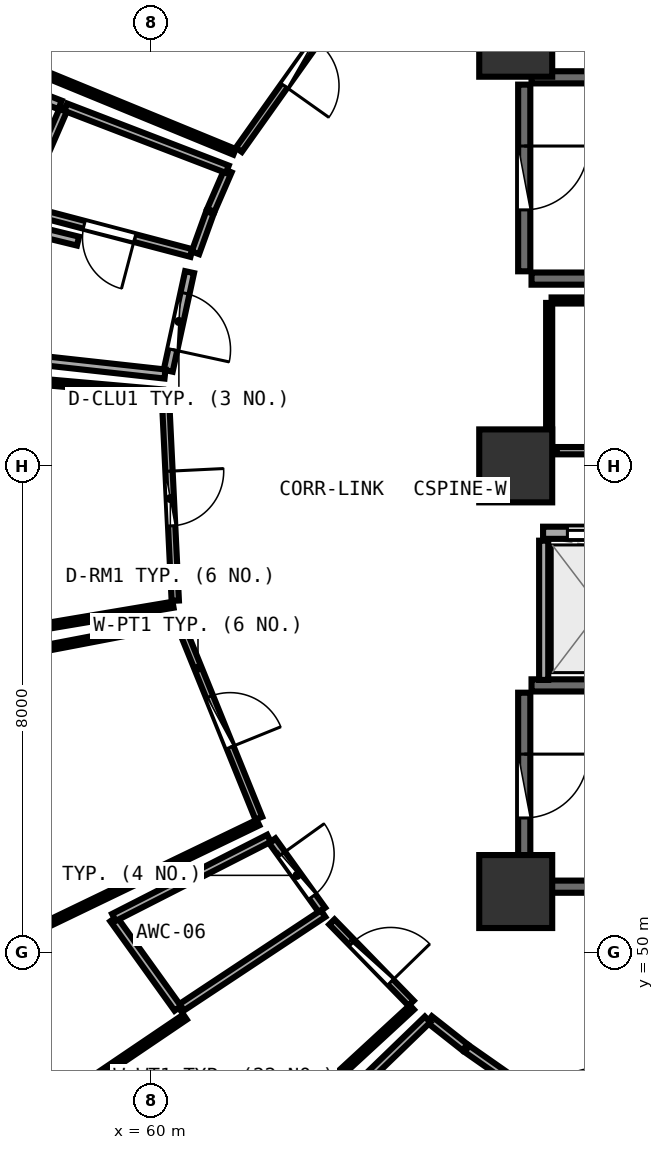
"""IFC4 building model, lengths in metres.
Left out: names, types, materials, properties, quantities, classifications, styles, units other than length and angle.
Written with IfcOpenShell. Run it as: python <this file> out.ifc"""

import sys

from ifc_helpers import new_model, si_unit, direction, frame, frame_2d, origin, origin_2d, place, context, subcontext, project, spatial, rectangle, extrude, element, fill, save


model = new_model("IFC4")
c1 = context("Model", 3, precision=1e-05, world=origin(), true_north=direction((0.0, 1.0)))
c2 = subcontext(c1, "Body", "Model", "MODEL_VIEW")
j1 = project(units=[si_unit("LENGTHUNIT", "METRE"), si_unit("PLANEANGLEUNIT", "RADIAN")], contexts=[c1])
p1 = place(None, origin())
s1 = spatial("IfcSite", under=j1, at=p1, CompositionType="ELEMENT")
p2 = place(p1, origin())
s2 = spatial("IfcBuilding", under=s1, at=p2, CompositionType="ELEMENT")
p3 = place(p2, frame((0.0, 0.0, 158.1)))
s3 = spatial("IfcBuildingStorey", under=s2, at=p3, CompositionType="ELEMENT", Elevation=158.1)
for number, where, z_axis, x_axis in (
    (1, (66.0, 51.0, 0.0), (0.0, 0.0, 1.0), (1.0, 0.0, 0.0)),
    (2, (66.0, 65.0, 0.0), (0.0, 0.0, 1.0), (1.0, 0.0, 0.0)),
    (3, (66.0, 58.0, 0.0), (0.0, 0.0, 1.0), (1.0, 0.0, 0.0)),
):
    element("IfcColumn", number, at=place(p3, frame(where, z_axis=z_axis, x_axis=x_axis)), inside=s3, PredefinedType="PILASTER", context=c2, shape_type="SweptSolid", body=[
        extrude(rectangle(XDim=1.2, YDim=1.2, at=origin_2d()), origin(), (0.0, 0.0, 1.0), 3.75),
    ])
for number, where, z_axis, x_axis in (
    (4, (66.26, 61.08, 0.0), (0.0, 0.0, 1.0), (1.0, 0.0, 0.0)),
    (5, (73.42, 64.39, 0.0), (0.0, 0.0, 1.0), (-1.0, 0.0, 0.0)),
):
    element("IfcWall", number, at=place(p3, frame(where, z_axis=z_axis, x_axis=x_axis)), inside=s3, PredefinedType="SHEAR", context=c2, shape_type="SweptSolid", body=[
        extrude(rectangle(XDim=7.16, YDim=0.2, at=frame_2d((3.58, 0.0))), origin(), (0.0, 0.0, 1.0), 3.49),
    ])
p4 = place(p3, frame((66.14, 64.27, 0.0), z_axis=(0.0, 0.0, 1.0), x_axis=(0.0, -1.0, 0.0)))
e6 = element("IfcWall", 6, at=p4, inside=s3, PredefinedType="SHEAR", context=c2, shape_type="SweptSolid", body=[
    extrude(rectangle(XDim=3.07, YDim=0.2, at=frame_2d((1.535, 0.0))), origin(), (0.0, 0.0, 1.0), 3.49),
])
p5 = place(p4, frame((1.01, 0.0, 0.0)))
e7 = element("IfcOpeningElement", 7, at=p5, cuts=e6, PredefinedType="OPENING", context=c2, shape_type="SweptSolid", body=[
    extrude(rectangle(XDim=1.05, YDim=2.1, at=frame_2d((0.525, 1.05))), frame((0.0, 0.11, 0.0), z_axis=(0.0, -1.0, 0.0), x_axis=(1.0, 0.0, 0.0)), (0.0, 0.0, 1.0), 0.22),
])
for number, where, z_axis, x_axis in (
    (8, (66.26, 51.08, 0.0), (0.0, 0.0, 1.0), (1.0, 0.0, 0.0)),
    (9, (73.42, 54.39, 0.0), (0.0, 0.0, 1.0), (-1.0, 0.0, 0.0)),
):
    element("IfcWall", number, at=place(p3, frame(where, z_axis=z_axis, x_axis=x_axis)), inside=s3, PredefinedType="SHEAR", context=c2, shape_type="SweptSolid", body=[
        extrude(rectangle(XDim=7.16, YDim=0.2, at=frame_2d((3.58, 0.0))), origin(), (0.0, 0.0, 1.0), 3.49),
    ])
p6 = place(p3, frame((66.14, 54.27, 0.0), z_axis=(0.0, 0.0, 1.0), x_axis=(0.0, -1.0, 0.0)))
e10 = element("IfcWall", 10, at=p6, inside=s3, PredefinedType="SHEAR", context=c2, shape_type="SweptSolid", body=[
    extrude(rectangle(XDim=3.07, YDim=0.2, at=frame_2d((1.535, 0.0))), origin(), (0.0, 0.0, 1.0), 3.49),
])
p7 = place(p6, frame((1.01, 0.0, 0.0)))
e11 = element("IfcOpeningElement", 11, at=p7, cuts=e10, PredefinedType="OPENING", context=c2, shape_type="SweptSolid", body=[
    extrude(rectangle(XDim=1.05, YDim=2.1, at=frame_2d((0.525, 1.05))), frame((0.0, 0.11, 0.0), z_axis=(0.0, -1.0, 0.0), x_axis=(1.0, 0.0, 0.0)), (0.0, 0.0, 1.0), 0.22),
])
p8 = place(p3, frame((66.45, 56.9, 0.0), z_axis=(0.0, 0.0, 1.0), x_axis=(1.0, 0.0, 0.0)))
e12 = element("IfcWall", 12, at=p8, inside=s3, PredefinedType="SOLIDWALL", context=c2, shape_type="SweptSolid", body=[
    extrude(rectangle(XDim=14.4, YDim=0.2, at=frame_2d((7.2, 0.0))), origin(), (0.0, 0.0, 1.0), 3.48),
])
p9 = place(p8, frame((0.4, 0.0, 0.0)))
e13 = element("IfcOpeningElement", 13, at=p9, cuts=e12, PredefinedType="OPENING", context=c2, shape_type="SweptSolid", body=[
    extrude(rectangle(XDim=1.1, YDim=2.1, at=frame_2d((0.55, 1.05))), frame((0.0, 0.11, 0.0), z_axis=(0.0, -1.0, 0.0), x_axis=(1.0, 0.0, 0.0)), (0.0, 0.0, 1.0), 0.22),
])
p10 = place(p8, frame((2.4, 0.0, 0.0)))
e14 = element("IfcOpeningElement", 14, at=p10, cuts=e12, PredefinedType="OPENING", context=c2, shape_type="SweptSolid", body=[
    extrude(rectangle(XDim=1.1, YDim=2.1, at=frame_2d((0.55, 1.05))), frame((0.0, 0.11, 0.0), z_axis=(0.0, -1.0, 0.0), x_axis=(1.0, 0.0, 0.0)), (0.0, 0.0, 1.0), 0.22),
])
p11 = place(p8, frame((4.4, 0.0, 0.0)))
e15 = element("IfcOpeningElement", 15, at=p11, cuts=e12, PredefinedType="OPENING", context=c2, shape_type="SweptSolid", body=[
    extrude(rectangle(XDim=1.1, YDim=2.1, at=frame_2d((0.55, 1.05))), frame((0.0, 0.11, 0.0), z_axis=(0.0, -1.0, 0.0), x_axis=(1.0, 0.0, 0.0)), (0.0, 0.0, 1.0), 0.22),
])
p12 = place(p3, frame((66.46, 54.48, 0.0), z_axis=(0.0, 0.0, 1.0), x_axis=(0.0, 1.0, 0.0)))
e16 = element("IfcWall", 16, at=p12, inside=s3, PredefinedType="PARTITIONING", context=c2, shape_type="SweptSolid", body=[
    extrude(rectangle(XDim=2.29, YDim=0.15, at=frame_2d((1.145, 0.0))), origin(), (0.0, 0.0, 1.0), 3.48),
])
p13 = place(p3, frame((66.675, 58.25, 0.0), z_axis=(0.0, 0.0, 1.0), x_axis=(1.0, 0.0, 0.0)))
e17 = element("IfcWall", 17, at=p13, inside=s3, PredefinedType="PARTITIONING", context=c2, shape_type="SweptSolid", body=[
    extrude(rectangle(XDim=5.715, YDim=0.12, at=frame_2d((2.857, 0.0))), origin(), (0.0, 0.0, 1.0), 3.48),
])
p14 = place(p13, frame((2.407, 0.0, 0.0)))
e18 = element("IfcOpeningElement", 18, at=p14, cuts=e17, PredefinedType="OPENING", context=c2, shape_type="SweptSolid", body=[
    extrude(rectangle(XDim=0.9, YDim=2.08, at=frame_2d((0.45, 1.04))), frame((0.0, 0.07, 0.0), z_axis=(0.0, -1.0, 0.0), x_axis=(1.0, 0.0, 0.0)), (0.0, 0.0, 1.0), 0.14),
])
p15 = place(p3, frame((63.462, 66.038, 0.0), z_axis=(0.0, 0.0, 1.0), x_axis=(-0.578762045024, -0.815496471629, 0.0)))
e19 = element("IfcWall", 19, at=p15, inside=s3, PredefinedType="PARTITIONING", context=c2, shape_type="SweptSolid", body=[
    extrude(rectangle(XDim=3.483, YDim=0.12, at=frame_2d((1.741, 0.0))), origin(), (0.0, 0.0, 1.0), 2.975),
])
p16 = place(p15, frame((1.291, 0.0, 0.0)))
e20 = element("IfcOpeningElement", 20, at=p16, cuts=e19, PredefinedType="OPENING", context=c2, shape_type="SweptSolid", body=[
    extrude(rectangle(XDim=0.9, YDim=2.08, at=frame_2d((0.45, 1.04))), frame((0.0, 0.07, 0.0), z_axis=(0.0, -1.0, 0.0), x_axis=(1.0, 0.0, 0.0)), (0.0, 0.0, 1.0), 0.14),
])
p17 = place(p3, frame((60.667, 61.5, 0.0), z_axis=(0.0, 0.0, 1.0), x_axis=(-0.967098346806, 0.254402805813, 0.0)))
e21 = element("IfcWall", 21, at=p17, inside=s3, PredefinedType="PLUMBINGWALL", context=c2, shape_type="SweptSolid", body=[
    extrude(rectangle(XDim=2.789, YDim=0.13, at=frame_2d((1.395, 0.0))), origin(), (0.0, 0.0, 1.0), 3.175),
])
p18 = place(p17, frame((0.964, 0.0, 0.0)))
e22 = element("IfcOpeningElement", 22, at=p18, cuts=e21, PredefinedType="OPENING", context=c2, shape_type="SweptSolid", body=[
    extrude(rectangle(XDim=0.86, YDim=2.05, at=frame_2d((0.43, 1.025))), frame((0.0, 0.075, 0.0), z_axis=(0.0, -1.0, 0.0), x_axis=(1.0, 0.0, 0.0)), (0.0, 0.0, 1.0), 0.15),
])
p19 = place(p3, frame((60.636, 61.186, 0.0), z_axis=(0.0, 0.0, 1.0), x_axis=(-0.211879832264, -0.977295726318, 0.0)))
e23 = element("IfcWall", 23, at=p19, inside=s3, PredefinedType="PARTITIONING", context=c2, shape_type="SweptSolid", body=[
    extrude(rectangle(XDim=1.659, YDim=0.15, at=frame_2d((0.83, 0.0))), origin(), (0.0, 0.0, 1.0), 3.48),
])
p20 = place(p19, frame((0.355, 0.0, 0.0)))
e24 = element("IfcOpeningElement", 24, at=p20, cuts=e23, PredefinedType="OPENING", context=c2, shape_type="SweptSolid", body=[
    extrude(rectangle(XDim=0.95, YDim=2.08, at=frame_2d((0.475, 1.04))), frame((0.0, 0.085, 0.0), z_axis=(0.0, -1.0, 0.0), x_axis=(1.0, 0.0, 0.0)), (0.0, 0.0, 1.0), 0.17),
])
p21 = place(p3, frame((60.238, 59.144, 0.0), z_axis=(0.0, 0.0, 1.0), x_axis=(0.048537190422, -0.998821375996, 0.0)))
e25 = element("IfcWall", 25, at=p21, inside=s3, PredefinedType="PARTITIONING", context=c2, shape_type="SweptSolid", body=[
    extrude(rectangle(XDim=3.365, YDim=0.12, at=frame_2d((1.683, 0.0))), origin(), (0.0, 0.0, 1.0), 2.975),
])
p22 = place(p21, frame((1.233, 0.0, 0.0)))
e26 = element("IfcOpeningElement", 26, at=p22, cuts=e25, PredefinedType="OPENING", context=c2, shape_type="SweptSolid", body=[
    extrude(rectangle(XDim=0.9, YDim=2.08, at=frame_2d((0.45, 1.04))), frame((0.0, 0.07, 0.0), z_axis=(0.0, -1.0, 0.0), x_axis=(1.0, 0.0, 0.0)), (0.0, 0.0, 1.0), 0.14),
])
p23 = place(p3, frame((60.492, 55.369, 0.0), z_axis=(0.0, 0.0, 1.0), x_axis=(0.3756420079, -0.926764847143, 0.0)))
e27 = element("IfcWall", 27, at=p23, inside=s3, PredefinedType="PARTITIONING", context=c2, shape_type="SweptSolid", body=[
    extrude(rectangle(XDim=3.413, YDim=0.12, at=frame_2d((1.707, 0.0))), origin(), (0.0, 0.0, 1.0), 3.235),
])
p24 = place(p23, frame((1.256, 0.0, 0.0)))
e28 = element("IfcOpeningElement", 28, at=p24, cuts=e27, PredefinedType="OPENING", context=c2, shape_type="SweptSolid", body=[
    extrude(rectangle(XDim=0.9, YDim=2.08, at=frame_2d((0.45, 1.04))), frame((0.0, 0.07, 0.0), z_axis=(0.0, -1.0, 0.0), x_axis=(1.0, 0.0, 0.0)), (0.0, 0.0, 1.0), 0.14),
])
p25 = place(p3, frame((61.995, 51.836, 0.0), z_axis=(0.0, 0.0, 1.0), x_axis=(0.583589438572, -0.81204886995, 0.0)))
e29 = element("IfcWall", 29, at=p25, inside=s3, PredefinedType="PLUMBINGWALL", context=c2, shape_type="SweptSolid", body=[
    extrude(rectangle(XDim=1.403, YDim=0.13, at=frame_2d((0.702, 0.0))), origin(), (0.0, 0.0, 1.0), 2.975),
])
p26 = place(p25, frame((0.272, 0.0, 0.0)))
e30 = element("IfcOpeningElement", 30, at=p26, cuts=e29, PredefinedType="OPENING", context=c2, shape_type="SweptSolid", body=[
    extrude(rectangle(XDim=0.86, YDim=2.05, at=frame_2d((0.43, 1.025))), frame((0.0, 0.075, 0.0), z_axis=(0.0, -1.0, 0.0), x_axis=(1.0, 0.0, 0.0)), (0.0, 0.0, 1.0), 0.15),
])
p27 = place(p3, frame((62.977, 50.5, 0.0), z_axis=(0.0, 0.0, 1.0), x_axis=(0.69801962686, -0.71607862733, 0.0)))
e31 = element("IfcWall", 31, at=p27, inside=s3, PredefinedType="PARTITIONING", context=c2, shape_type="SweptSolid", body=[
    extrude(rectangle(XDim=1.866, YDim=0.12, at=frame_2d((0.933, 0.0))), origin(), (0.0, 0.0, 1.0), 2.975),
])
p28 = place(p27, frame((0.483, 0.0, 0.0)))
e32 = element("IfcOpeningElement", 32, at=p28, cuts=e31, PredefinedType="OPENING", context=c2, shape_type="SweptSolid", body=[
    extrude(rectangle(XDim=0.9, YDim=2.08, at=frame_2d((0.45, 1.04))), frame((0.0, 0.07, 0.0), z_axis=(0.0, -1.0, 0.0), x_axis=(1.0, 0.0, 0.0)), (0.0, 0.0, 1.0), 0.14),
])
p29 = place(p3, frame((72.41, 60.72, 0.0), z_axis=(0.0, 0.0, 1.0), x_axis=(-1.0, 0.0, 0.0)))
e33 = element("IfcWall", 33, at=p29, inside=s3, PredefinedType="PARTITIONING", context=c2, shape_type="SweptSolid", body=[
    extrude(rectangle(XDim=5.82, YDim=0.1, at=frame_2d((2.91, 0.0))), origin(), (0.0, 0.0, 1.0), 3.48),
])
p30 = place(p3, frame((66.55, 60.68, 0.0), z_axis=(0.0, 0.0, 1.0), x_axis=(0.0, -1.0, 0.0)))
e34 = element("IfcWall", 34, at=p30, inside=s3, PredefinedType="PARTITIONING", context=c2, shape_type="SweptSolid", body=[
    extrude(rectangle(XDim=2.383, YDim=0.1, at=frame_2d((1.191, 0.0))), origin(), (0.0, 0.0, 1.0), 3.48),
])
p31 = place(p3, frame((61.375, 63.164, 0.0), z_axis=(0.0, 0.0, 1.0), x_axis=(-0.924943940784, 0.380103546953, 0.0)))
e35 = element("IfcWall", 35, at=p31, inside=s3, PredefinedType="PARTITIONING", context=c2, shape_type="SweptSolid", body=[
    extrude(rectangle(XDim=8.038, YDim=0.1, at=frame_2d((4.019, 0.0))), origin(), (0.0, 0.0, 1.0), 2.975),
])
p32 = place(p3, frame((61.268, 62.853, 0.0), z_axis=(0.0, 0.0, 1.0), x_axis=(-0.398284741881, -0.917261829787, 0.0)))
e36 = element("IfcWall", 36, at=p32, inside=s3, PredefinedType="PLUMBINGWALL", context=c2, shape_type="SweptSolid", body=[
    extrude(rectangle(XDim=0.708, YDim=0.13, at=frame_2d((0.354, 0.0))), origin(), (0.0, 0.0, 1.0), 3.235),
])
p33 = place(p3, frame((60.971, 62.166, 0.0), z_axis=(0.0, 0.0, 1.0), x_axis=(-0.340044773791, -0.940409246987, 0.0)))
e37 = element("IfcWall", 37, at=p33, inside=s3, PredefinedType="PLUMBINGWALL", context=c2, shape_type="SweptSolid", body=[
    extrude(rectangle(XDim=0.704, YDim=0.13, at=frame_2d((0.352, 0.0))), origin(), (0.0, 0.0, 1.0), 3.235),
])
p34 = place(p3, frame((58.227, 63.093, 0.0), z_axis=(0.0, 0.0, 1.0), x_axis=(0.39925148709, 0.916841453064, 0.0)))
e38 = element("IfcWall", 38, at=p34, inside=s3, PredefinedType="PLUMBINGWALL", context=c2, shape_type="SweptSolid", body=[
    extrude(rectangle(XDim=0.866, YDim=0.13, at=frame_2d((0.433, 0.0))), origin(), (0.0, 0.0, 1.0), 3.175),
])
p35 = place(p3, frame((58.6, 63.899, 0.0), z_axis=(0.0, 0.0, 1.0), x_axis=(0.933544382438, -0.358461833418, 0.0)))
e39 = element("IfcWall", 39, at=p35, inside=s3, PredefinedType="PLUMBINGWALL", context=c2, shape_type="SweptSolid", body=[
    extrude(rectangle(XDim=2.847, YDim=0.13, at=frame_2d((1.423, 0.0))), origin(), (0.0, 0.0, 1.0), 3.175),
])
p36 = place(p3, frame((60.232, 59.51, 0.0), z_axis=(0.0, 0.0, 1.0), x_axis=(-0.993990557846, 0.109465843587, 0.0)))
e40 = element("IfcWall", 40, at=p36, inside=s3, PredefinedType="PARTITIONING", context=c2, shape_type="SweptSolid", body=[
    extrude(rectangle(XDim=8.158, YDim=0.15, at=frame_2d((4.079, 0.0))), origin(), (0.0, 0.0, 1.0), 3.025),
])
p37 = place(p3, frame((53.723, 65.777, 0.0), z_axis=(0.0, 0.0, 1.0), x_axis=(0.933303856141, -0.359087610636, 0.0)))
e41 = element("IfcWall", 41, at=p37, inside=s3, PredefinedType="PARTITIONING", context=c2, shape_type="SweptSolid", body=[
    extrude(rectangle(XDim=5.125, YDim=0.15, at=frame_2d((2.562, 0.0))), origin(), (0.0, 0.0, 1.0), 2.975),
])
p38 = place(p3, frame((57.821, 61.936, 0.0), z_axis=(0.0, 0.0, 1.0), x_axis=(0.971451046406, -0.237240098712, 0.0)))
e42 = element("IfcWall", 42, at=p38, inside=s3, PredefinedType="PARTITIONING", context=c2, shape_type="SweptSolid", body=[
    extrude(rectangle(XDim=1.01, YDim=0.15, at=frame_2d((0.505, 0.0))), origin(), (0.0, 0.0, 1.0), 3.175),
])
p39 = place(p3, frame((60.365, 55.716, 0.0), z_axis=(0.0, 0.0, 1.0), x_axis=(-0.986127701838, -0.165988420279, 0.0)))
e43 = element("IfcWall", 43, at=p39, inside=s3, PredefinedType="PARTITIONING", context=c2, shape_type="SweptSolid", body=[
    extrude(rectangle(XDim=8.144, YDim=0.1, at=frame_2d((4.072, 0.0))), origin(), (0.0, 0.0, 1.0), 3.025),
])
p40 = place(p3, frame((52.064, 59.921, 0.0), z_axis=(0.0, 0.0, 1.0), x_axis=(0.996168646625, -0.087453001553, 0.0)))
e44 = element("IfcWall", 44, at=p40, inside=s3, PredefinedType="PARTITIONING", context=c2, shape_type="SweptSolid", body=[
    extrude(rectangle(XDim=8.163, YDim=0.1, at=frame_2d((4.082, 0.0))), origin(), (0.0, 0.0, 1.0), 3.025),
])
p41 = place(p3, frame((61.761, 52.134, 0.0), z_axis=(0.0, 0.0, 1.0), x_axis=(-0.900968975812, -0.433883515042, 0.0)))
e45 = element("IfcWall", 45, at=p41, inside=s3, PredefinedType="PARTITIONING", context=c2, shape_type="SweptSolid", body=[
    extrude(rectangle(XDim=8.0, YDim=0.1, at=frame_2d((4.0, 0.0))), origin(), (0.0, 0.0, 1.0), 2.975),
])
p42 = place(p3, frame((52.438, 53.888, 0.0), z_axis=(0.0, 0.0, 1.0), x_axis=(0.982187250003, 0.187904778897, 0.0)))
e46 = element("IfcWall", 46, at=p42, inside=s3, PredefinedType="PARTITIONING", context=c2, shape_type="SweptSolid", body=[
    extrude(rectangle(XDim=8.137, YDim=0.1, at=frame_2d((4.069, 0.0))), origin(), (0.0, 0.0, 1.0), 3.025),
])
p43 = place(p3, frame((62.832, 50.637, 0.0), z_axis=(0.0, 0.0, 1.0), x_axis=(-0.833743735775, -0.55215159427, 0.0)))
e47 = element("IfcWall", 47, at=p43, inside=s3, PredefinedType="PLUMBINGWALL", context=c2, shape_type="SweptSolid", body=[
    extrude(rectangle(XDim=2.833, YDim=0.13, at=frame_2d((1.416, 0.0))), origin(), (0.0, 0.0, 1.0), 3.235),
])
p44 = place(p3, frame((60.442, 49.078, 0.0), z_axis=(0.0, 0.0, 1.0), x_axis=(-0.583480474688, 0.812127167172, 0.0)))
e48 = element("IfcWall", 48, at=p44, inside=s3, PredefinedType="PLUMBINGWALL", context=c2, shape_type="SweptSolid", body=[
    extrude(rectangle(XDim=1.811, YDim=0.13, at=frame_2d((0.906, 0.0))), origin(), (0.0, 0.0, 1.0), 3.48),
])
p45 = place(p3, frame((59.392, 50.574, 0.0), z_axis=(0.0, 0.0, 1.0), x_axis=(0.890678731245, 0.45463325627, 0.0)))
e49 = element("IfcWall", 49, at=p45, inside=s3, PredefinedType="PLUMBINGWALL", context=c2, shape_type="SweptSolid", body=[
    extrude(rectangle(XDim=2.863, YDim=0.13, at=frame_2d((1.432, 0.0))), origin(), (0.0, 0.0, 1.0), 2.975),
])
p46 = place(p3, frame((64.292, 49.094, 0.0), z_axis=(0.0, 0.0, 1.0), x_axis=(-0.73529828134, -0.677743636973, 0.0)))
e50 = element("IfcWall", 50, at=p46, inside=s3, PredefinedType="PARTITIONING", context=c2, shape_type="SweptSolid", body=[
    extrude(rectangle(XDim=7.771, YDim=0.1, at=frame_2d((3.886, 0.0))), origin(), (0.0, 0.0, 1.0), 3.025),
])
p47 = place(p3, frame((56.367, 46.096, 0.0), z_axis=(0.0, 0.0, 1.0), x_axis=(0.828061619218, 0.560637097219, 0.0)))
e51 = element("IfcWall", 51, at=p47, inside=s3, PredefinedType="PARTITIONING", context=c2, shape_type="SweptSolid", body=[
    extrude(rectangle(XDim=5.065, YDim=0.1, at=frame_2d((2.532, 0.0))), origin(), (0.0, 0.0, 1.0), 3.025),
])
p48 = place(p3, frame((64.581, 48.899, 0.0), z_axis=(0.0, 0.0, 1.0), x_axis=(0.785042223167, -0.619442255456, 0.0)))
e52 = element("IfcWall", 52, at=p48, inside=s3, PredefinedType="PLUMBINGWALL", context=c2, shape_type="SweptSolid", body=[
    extrude(rectangle(XDim=0.745, YDim=0.13, at=frame_2d((0.372, 0.0))), origin(), (0.0, 0.0, 1.0), 2.975),
])
p49 = place(p3, frame((65.198, 48.414, 0.0), z_axis=(0.0, 0.0, 1.0), x_axis=(0.819339212877, -0.573309039038, 0.0)))
e53 = element("IfcWall", 53, at=p49, inside=s3, PredefinedType="PLUMBINGWALL", context=c2, shape_type="SweptSolid", body=[
    extrude(rectangle(XDim=0.748, YDim=0.13, at=frame_2d((0.374, 0.0))), origin(), (0.0, 0.0, 1.0), 2.975),
])
p50 = place(p3, frame((62.581, 46.994, 0.0), z_axis=(0.0, 0.0, 1.0), x_axis=(0.719038860306, 0.694969867958, 0.0)))
e54 = element("IfcWall", 54, at=p50, inside=s3, PredefinedType="PLUMBINGWALL", context=c2, shape_type="SweptSolid", body=[
    extrude(rectangle(XDim=2.739, YDim=0.13, at=frame_2d((1.369, 0.0))), origin(), (0.0, 0.0, 1.0), 3.235),
])
p51 = place(p5, origin())
e55 = element("IfcDoor", 55, at=p51, inside=s3, OperationType="SINGLE_SWING_LEFT", PredefinedType="DOOR", context=c2, shape_type="SweptSolid", body=[
    extrude(rectangle(XDim=1.05, YDim=2.1, at=frame_2d((0.525, 1.05))), frame((0.0, 0.025, 0.0), z_axis=(0.0, -1.0, 0.0), x_axis=(1.0, 0.0, 0.0)), (0.0, 0.0, 1.0), 0.05),
])
fill(e7, e55)
p52 = place(p7, origin())
e56 = element("IfcDoor", 56, at=p52, inside=s3, OperationType="SINGLE_SWING_LEFT", PredefinedType="DOOR", context=c2, shape_type="SweptSolid", body=[
    extrude(rectangle(XDim=1.05, YDim=2.1, at=frame_2d((0.525, 1.05))), frame((0.0, 0.025, 0.0), z_axis=(0.0, -1.0, 0.0), x_axis=(1.0, 0.0, 0.0)), (0.0, 0.0, 1.0), 0.05),
])
fill(e11, e56)
p53 = place(p9, origin())
e57 = element("IfcDoor", 57, at=p53, inside=s3, OperationType="DOUBLE_DOOR_SLIDING", PredefinedType="DOOR", context=c2, shape_type="SweptSolid", body=[
    extrude(rectangle(XDim=1.1, YDim=2.1, at=frame_2d((0.55, 1.05))), frame((0.0, 0.025, 0.0), z_axis=(0.0, -1.0, 0.0), x_axis=(1.0, 0.0, 0.0)), (0.0, 0.0, 1.0), 0.05),
])
fill(e13, e57)
p54 = place(p16, origin())
e58 = element("IfcDoor", 58, at=p54, inside=s3, OperationType="SINGLE_SWING_RIGHT", PredefinedType="DOOR", context=c2, shape_type="SweptSolid", body=[
    extrude(rectangle(XDim=0.9, YDim=2.08, at=frame_2d((0.45, 1.04))), frame((0.0, 0.025, 0.0), z_axis=(0.0, -1.0, 0.0), x_axis=(1.0, 0.0, 0.0)), (0.0, 0.0, 1.0), 0.05),
])
fill(e20, e58)
p55 = place(p18, origin())
e59 = element("IfcDoor", 59, at=p55, inside=s3, OperationType="SINGLE_SWING_LEFT", PredefinedType="DOOR", context=c2, shape_type="SweptSolid", body=[
    extrude(rectangle(XDim=0.86, YDim=2.05, at=frame_2d((0.43, 1.025))), frame((0.0, 0.025, 0.0), z_axis=(0.0, -1.0, 0.0), x_axis=(1.0, 0.0, 0.0)), (0.0, 0.0, 1.0), 0.05),
])
fill(e22, e59)
p56 = place(p20, origin())
e60 = element("IfcDoor", 60, at=p56, inside=s3, OperationType="SINGLE_SWING_RIGHT", PredefinedType="DOOR", context=c2, shape_type="SweptSolid", body=[
    extrude(rectangle(XDim=0.95, YDim=2.08, at=frame_2d((0.475, 1.04))), frame((0.0, 0.025, 0.0), z_axis=(0.0, -1.0, 0.0), x_axis=(1.0, 0.0, 0.0)), (0.0, 0.0, 1.0), 0.05),
])
fill(e24, e60)
p57 = place(p22, origin())
e61 = element("IfcDoor", 61, at=p57, inside=s3, OperationType="SINGLE_SWING_LEFT", PredefinedType="DOOR", context=c2, shape_type="SweptSolid", body=[
    extrude(rectangle(XDim=0.9, YDim=2.08, at=frame_2d((0.45, 1.04))), frame((0.0, 0.025, 0.0), z_axis=(0.0, -1.0, 0.0), x_axis=(1.0, 0.0, 0.0)), (0.0, 0.0, 1.0), 0.05),
])
fill(e26, e61)
p58 = place(p24, origin())
e62 = element("IfcDoor", 62, at=p58, inside=s3, OperationType="SINGLE_SWING_RIGHT", PredefinedType="DOOR", context=c2, shape_type="SweptSolid", body=[
    extrude(rectangle(XDim=0.9, YDim=2.08, at=frame_2d((0.45, 1.04))), frame((0.0, 0.025, 0.0), z_axis=(0.0, -1.0, 0.0), x_axis=(1.0, 0.0, 0.0)), (0.0, 0.0, 1.0), 0.05),
])
fill(e28, e62)
p59 = place(p26, origin())
e63 = element("IfcDoor", 63, at=p59, inside=s3, OperationType="SINGLE_SWING_LEFT", PredefinedType="DOOR", context=c2, shape_type="SweptSolid", body=[
    extrude(rectangle(XDim=0.86, YDim=2.05, at=frame_2d((0.43, 1.025))), frame((0.0, 0.025, 0.0), z_axis=(0.0, -1.0, 0.0), x_axis=(1.0, 0.0, 0.0)), (0.0, 0.0, 1.0), 0.05),
])
fill(e30, e63)
p60 = place(p28, origin())
e64 = element("IfcDoor", 64, at=p60, inside=s3, OperationType="SINGLE_SWING_RIGHT", PredefinedType="DOOR", context=c2, shape_type="SweptSolid", body=[
    extrude(rectangle(XDim=0.9, YDim=2.08, at=frame_2d((0.45, 1.04))), frame((0.0, 0.025, 0.0), z_axis=(0.0, -1.0, 0.0), x_axis=(1.0, 0.0, 0.0)), (0.0, 0.0, 1.0), 0.05),
])
fill(e32, e64)
save(model, sys.argv[1])
